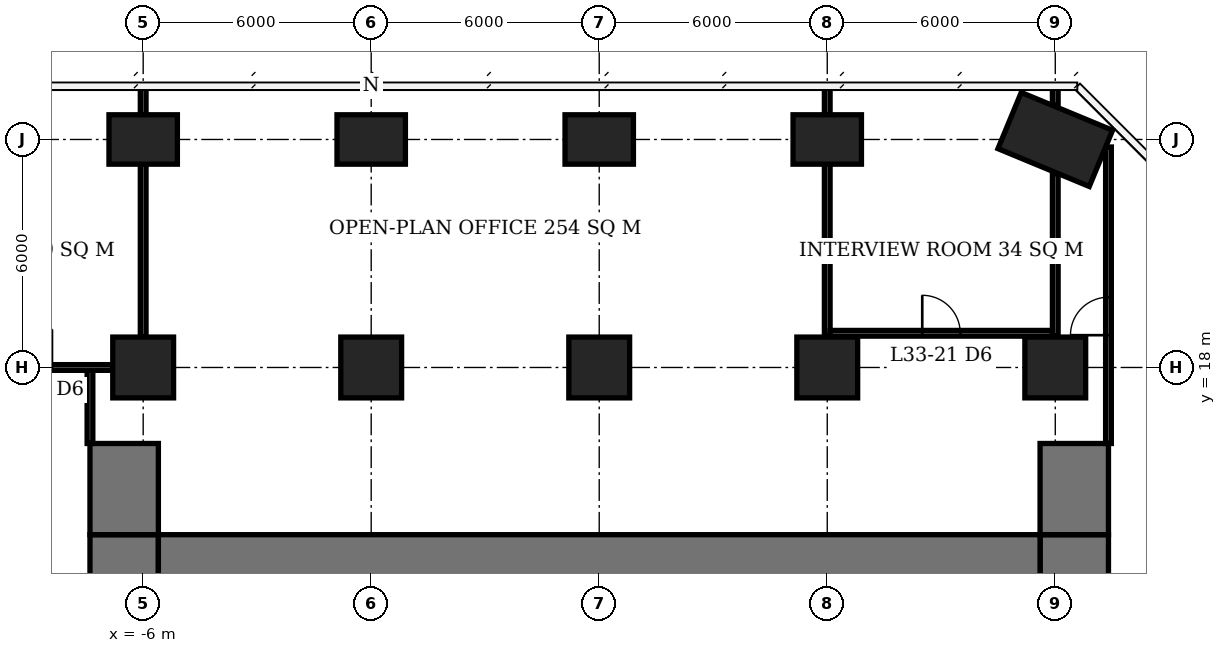
"""IFC4 building model, lengths in metres.
Left out: names, types, materials, properties, quantities, classifications, styles, units other than length and angle.
Written with IfcOpenShell. Run it as: python <this file> out.ifc"""

import sys

from ifc_helpers import new_model, si_unit, direction, frame, frame_2d, origin, origin_2d, place, context, subcontext, project, spatial, rectangle, extrude, element, fill, save


model = new_model("IFC4")
c1 = context("Model", 3, precision=1e-05, world=origin(), true_north=direction((0.0, 1.0)))
c2 = subcontext(c1, "Body", "Model", "MODEL_VIEW")
j1 = project(units=[si_unit("LENGTHUNIT", "METRE"), si_unit("PLANEANGLEUNIT", "RADIAN")], contexts=[c1])
p1 = place(None, origin())
s1 = spatial("IfcSite", under=j1, at=p1, CompositionType="ELEMENT")
p2 = place(p1, origin())
s2 = spatial("IfcBuilding", under=s1, at=p2, CompositionType="ELEMENT")
p3 = place(p2, frame((0.0, 0.0, 136.7)))
s3 = spatial("IfcBuildingStorey", under=s2, at=p3, CompositionType="ELEMENT", Elevation=136.7)
p4 = place(p3, frame((-6.0, 18.0, 0.0), z_axis=(0.0, 0.0, 1.0), x_axis=(1.0, 0.0, 0.0)))
e1 = element("IfcColumn", 1, at=p4, inside=s3, PredefinedType="COLUMN", context=c2, shape_type="SweptSolid", body=[
    extrude(rectangle(XDim=1.6, YDim=1.6, at=origin_2d()), origin(), (0.0, 0.0, 1.0), 3.9),
])
p5 = place(p3, frame((-6.0, 24.0, 0.0), z_axis=(0.0, 0.0, 1.0), x_axis=(1.0, 0.0, 0.0)))
e2 = element("IfcColumn", 2, at=p5, inside=s3, PredefinedType="COLUMN", context=c2, shape_type="SweptSolid", body=[
    extrude(rectangle(XDim=1.8, YDim=1.3, at=origin_2d()), origin(), (0.0, 0.0, 1.0), 3.9),
])
p6 = place(p3, frame((0.0, 18.0, 0.0), z_axis=(0.0, 0.0, 1.0), x_axis=(1.0, 0.0, 0.0)))
e3 = element("IfcColumn", 3, at=p6, inside=s3, PredefinedType="COLUMN", context=c2, shape_type="SweptSolid", body=[
    extrude(rectangle(XDim=1.6, YDim=1.6, at=origin_2d()), origin(), (0.0, 0.0, 1.0), 3.9),
])
p7 = place(p3, frame((0.0, 24.0, 0.0), z_axis=(0.0, 0.0, 1.0), x_axis=(1.0, 0.0, 0.0)))
e4 = element("IfcColumn", 4, at=p7, inside=s3, PredefinedType="COLUMN", context=c2, shape_type="SweptSolid", body=[
    extrude(rectangle(XDim=1.8, YDim=1.3, at=origin_2d()), origin(), (0.0, 0.0, 1.0), 3.9),
])
p8 = place(p3, frame((6.0, 18.0, 0.0), z_axis=(0.0, 0.0, 1.0), x_axis=(1.0, 0.0, 0.0)))
e5 = element("IfcColumn", 5, at=p8, inside=s3, PredefinedType="COLUMN", context=c2, shape_type="SweptSolid", body=[
    extrude(rectangle(XDim=1.6, YDim=1.6, at=origin_2d()), origin(), (0.0, 0.0, 1.0), 3.9),
])
p9 = place(p3, frame((6.0, 24.0, 0.0), z_axis=(0.0, 0.0, 1.0), x_axis=(1.0, 0.0, 0.0)))
e6 = element("IfcColumn", 6, at=p9, inside=s3, PredefinedType="COLUMN", context=c2, shape_type="SweptSolid", body=[
    extrude(rectangle(XDim=1.8, YDim=1.3, at=origin_2d()), origin(), (0.0, 0.0, 1.0), 3.9),
])
p10 = place(p3, frame((12.0, 18.0, 0.0), z_axis=(0.0, 0.0, 1.0), x_axis=(1.0, 0.0, 0.0)))
e7 = element("IfcColumn", 7, at=p10, inside=s3, PredefinedType="COLUMN", context=c2, shape_type="SweptSolid", body=[
    extrude(rectangle(XDim=1.6, YDim=1.6, at=origin_2d()), origin(), (0.0, 0.0, 1.0), 3.9),
])
p11 = place(p3, frame((12.0, 24.0, 0.0), z_axis=(0.0, 0.0, 1.0), x_axis=(1.0, 0.0, 0.0)))
e8 = element("IfcColumn", 8, at=p11, inside=s3, PredefinedType="COLUMN", context=c2, shape_type="SweptSolid", body=[
    extrude(rectangle(XDim=1.8, YDim=1.3, at=origin_2d()), origin(), (0.0, 0.0, 1.0), 3.9),
])
p12 = place(p3, frame((18.0, 18.0, 0.0), z_axis=(0.0, 0.0, 1.0), x_axis=(1.0, 0.0, 0.0)))
e9 = element("IfcColumn", 9, at=p12, inside=s3, PredefinedType="COLUMN", context=c2, shape_type="SweptSolid", body=[
    extrude(rectangle(XDim=1.6, YDim=1.6, at=origin_2d()), origin(), (0.0, 0.0, 1.0), 3.9),
])
p13 = place(p3, frame((18.0, 24.0, 0.0), z_axis=(0.0, 0.0, 1.0), x_axis=(0.923879532511, -0.382683432365, 0.0)))
e10 = element("IfcColumn", 10, at=p13, inside=s3, PredefinedType="COLUMN", context=c2, shape_type="SweptSolid", body=[
    extrude(rectangle(XDim=2.6, YDim=1.6, at=origin_2d()), origin(), (0.0, 0.0, 1.0), 3.9),
])
p14 = place(p3, frame((-5.6, 12.6, 0.0), z_axis=(0.0, 0.0, 1.0), x_axis=(1.0, 0.0, 0.0)))
e11 = element("IfcWall", 11, at=p14, inside=s3, PredefinedType="SHEAR", context=c2, shape_type="SweptSolid", body=[
    extrude(rectangle(XDim=23.2, YDim=2.0, at=frame_2d((11.6, 0.0))), origin(), (0.0, 0.0, 1.0), 3.9),
])
p15 = place(p3, frame((-6.5, -7.6, 0.0), z_axis=(0.0, 0.0, 1.0), x_axis=(0.0, 1.0, 0.0)))
e12 = element("IfcWall", 12, at=p15, inside=s3, PredefinedType="SHEAR", context=c2, shape_type="SweptSolid", body=[
    extrude(rectangle(XDim=21.2, YDim=1.8, at=frame_2d((10.6, 0.0))), origin(), (0.0, 0.0, 1.0), 3.9),
])
p16 = place(p15, frame((7.8, 0.0, 0.0)))
e13 = element("IfcOpeningElement", 13, at=p16, cuts=e12, PredefinedType="OPENING", context=c2, shape_type="SweptSolid", body=[
    extrude(rectangle(XDim=1.8, YDim=2.4, at=frame_2d((0.9, 1.2))), frame((0.0, 0.91, 0.0), z_axis=(0.0, -1.0, 0.0), x_axis=(1.0, 0.0, 0.0)), (0.0, 0.0, 1.0), 1.82),
])
p17 = place(p3, frame((18.5, -7.6, 0.0), z_axis=(0.0, 0.0, 1.0), x_axis=(0.0, 1.0, 0.0)))
e14 = element("IfcWall", 14, at=p17, inside=s3, PredefinedType="SHEAR", context=c2, shape_type="SweptSolid", body=[
    extrude(rectangle(XDim=21.2, YDim=1.8, at=frame_2d((10.6, 0.0))), origin(), (0.0, 0.0, 1.0), 3.9),
])
p18 = place(p17, frame((9.2, 0.0, 0.0)))
e15 = element("IfcOpeningElement", 15, at=p18, cuts=e14, PredefinedType="OPENING", context=c2, shape_type="SweptSolid", body=[
    extrude(rectangle(XDim=1.8, YDim=2.4, at=frame_2d((0.9, 1.2))), frame((0.0, 0.91, 0.0), z_axis=(0.0, -1.0, 0.0), x_axis=(1.0, 0.0, 0.0)), (0.0, 0.0, 1.0), 1.82),
])
for number, where, z_axis, x_axis in (
    (16, (-6.5, 13.6, 0.0), (0.0, 0.0, 1.0), (0.0, 1.0, 0.0)),
    (17, (18.5, 13.6, 0.0), (0.0, 0.0, 1.0), (0.0, 1.0, 0.0)),
):
    element("IfcWall", number, at=place(p3, frame(where, z_axis=z_axis, x_axis=x_axis)), inside=s3, PredefinedType="SHEAR", context=c2, shape_type="SweptSolid", body=[
        extrude(rectangle(XDim=2.4, YDim=1.8, at=frame_2d((1.2, 0.0))), origin(), (0.0, 0.0, 1.0), 3.9),
    ])
p19 = place(p3, frame((-11.2, 18.0, 0.0), z_axis=(0.0, 0.0, 1.0), x_axis=(1.0, 0.0, 0.0)))
e18 = element("IfcWall", 18, at=p19, inside=s3, PredefinedType="PARTITIONING", context=c2, shape_type="SweptSolid", body=[
    extrude(rectangle(XDim=4.4, YDim=0.15, at=frame_2d((2.2, 0.0))), origin(), (0.0, 0.0, 1.0), 3.65),
])
p20 = place(p19, frame((1.8, 0.0, 0.0)))
e19 = element("IfcOpeningElement", 19, at=p20, cuts=e18, PredefinedType="OPENING", context=c2, shape_type="SweptSolid", body=[
    extrude(rectangle(XDim=1.0, YDim=2.1, at=frame_2d((0.5, 1.05))), frame((0.0, 0.085, 0.0), z_axis=(0.0, -1.0, 0.0), x_axis=(1.0, 0.0, 0.0)), (0.0, 0.0, 1.0), 0.17),
])
p21 = place(p3, frame((12.075, 18.9, 0.0), z_axis=(0.0, 0.0, 1.0), x_axis=(1.0, 0.0, 0.0)))
e20 = element("IfcWall", 20, at=p21, inside=s3, PredefinedType="PARTITIONING", context=c2, shape_type="SweptSolid", body=[
    extrude(rectangle(XDim=5.85, YDim=0.15, at=frame_2d((2.925, 0.0))), origin(), (0.0, 0.0, 1.0), 3.65),
])
p22 = place(p21, frame((2.425, 0.0, 0.0)))
e21 = element("IfcOpeningElement", 21, at=p22, cuts=e20, PredefinedType="OPENING", context=c2, shape_type="SweptSolid", body=[
    extrude(rectangle(XDim=1.0, YDim=2.1, at=frame_2d((0.5, 1.05))), frame((0.0, 0.085, 0.0), z_axis=(0.0, -1.0, 0.0), x_axis=(1.0, 0.0, 0.0)), (0.0, 0.0, 1.0), 0.17),
])
p23 = place(p3, frame((-6.0, 18.8, 0.0), z_axis=(0.0, 0.0, 1.0), x_axis=(0.0, 1.0, 0.0)))
e22 = element("IfcWall", 22, at=p23, inside=s3, PredefinedType="PARTITIONING", context=c2, shape_type="SweptSolid", body=[
    extrude(rectangle(XDim=4.55, YDim=0.15, at=frame_2d((2.275, 0.0))), origin(), (0.0, 0.0, 1.0), 3.65),
])
p24 = place(p3, frame((-6.0, 24.65, 0.0), z_axis=(0.0, 0.0, 1.0), x_axis=(0.0, 1.0, 0.0)))
e23 = element("IfcWall", 23, at=p24, inside=s3, PredefinedType="PARTITIONING", context=c2, shape_type="SweptSolid", body=[
    extrude(rectangle(XDim=0.75, YDim=0.15, at=frame_2d((0.375, 0.0))), origin(), (0.0, 0.0, 1.0), 3.65),
])
p25 = place(p3, frame((12.0, 18.825, 0.0), z_axis=(0.0, 0.0, 1.0), x_axis=(0.0, 1.0, 0.0)))
e24 = element("IfcWall", 24, at=p25, inside=s3, PredefinedType="PARTITIONING", context=c2, shape_type="SweptSolid", body=[
    extrude(rectangle(XDim=4.525, YDim=0.15, at=frame_2d((2.263, 0.0))), origin(), (0.0, 0.0, 1.0), 3.65),
])
p26 = place(p3, frame((12.0, 24.65, 0.0), z_axis=(0.0, 0.0, 1.0), x_axis=(0.0, 1.0, 0.0)))
e25 = element("IfcWall", 25, at=p26, inside=s3, PredefinedType="PARTITIONING", context=c2, shape_type="SweptSolid", body=[
    extrude(rectangle(XDim=0.75, YDim=0.15, at=frame_2d((0.375, 0.0))), origin(), (0.0, 0.0, 1.0), 3.65),
])
p27 = place(p3, frame((18.0, 18.825, 0.0), z_axis=(0.0, 0.0, 1.0), x_axis=(0.0, 1.0, 0.0)))
e26 = element("IfcWall", 26, at=p27, inside=s3, PredefinedType="PARTITIONING", context=c2, shape_type="SweptSolid", body=[
    extrude(rectangle(XDim=4.278, YDim=0.15, at=frame_2d((2.139, 0.0))), origin(), (0.0, 0.0, 1.0), 3.65),
])
p28 = place(p3, frame((18.0, 24.897, 0.0), z_axis=(0.0, 0.0, 1.0), x_axis=(0.0, 1.0, 0.0)))
e27 = element("IfcWall", 27, at=p28, inside=s3, PredefinedType="PARTITIONING", context=c2, shape_type="SweptSolid", body=[
    extrude(rectangle(XDim=0.503, YDim=0.15, at=frame_2d((0.251, 0.0))), origin(), (0.0, 0.0, 1.0), 3.65),
])
p29 = place(p3, frame((-7.4, 16.0, 0.0), z_axis=(0.0, 0.0, 1.0), x_axis=(0.0, 1.0, 0.0)))
e28 = element("IfcWall", 28, at=p29, inside=s3, PredefinedType="PARTITIONING", context=c2, shape_type="SweptSolid", body=[
    extrude(rectangle(XDim=1.925, YDim=0.15, at=frame_2d((0.962, 0.0))), origin(), (0.0, 0.0, 1.0), 3.65),
])
p30 = place(p3, frame((19.4, 16.0, 0.0), z_axis=(0.0, 0.0, 1.0), x_axis=(0.0, 1.0, 0.0)))
e29 = element("IfcWall", 29, at=p30, inside=s3, PredefinedType="PARTITIONING", context=c2, shape_type="SweptSolid", body=[
    extrude(rectangle(XDim=7.802, YDim=0.15, at=frame_2d((3.901, 0.0))), origin(), (0.0, 0.0, 1.0), 3.65),
])
p31 = place(p30, frame((2.85, 0.0, 0.0)))
e30 = element("IfcOpeningElement", 30, at=p31, cuts=e29, PredefinedType="OPENING", context=c2, shape_type="SweptSolid", body=[
    extrude(rectangle(XDim=1.0, YDim=2.1, at=frame_2d((0.5, 1.05))), frame((0.0, 0.085, 0.0), z_axis=(0.0, -1.0, 0.0), x_axis=(1.0, 0.0, 0.0)), (0.0, 0.0, 1.0), 0.17),
])
p32 = place(p22, origin())
e31 = element("IfcDoor", 31, at=p32, inside=s3, OperationType="SINGLE_SWING_LEFT", PredefinedType="DOOR", context=c2, shape_type="SweptSolid", body=[
    extrude(rectangle(XDim=1.0, YDim=2.1, at=frame_2d((0.5, 1.05))), frame((0.0, 0.025, 0.0), z_axis=(0.0, -1.0, 0.0), x_axis=(1.0, 0.0, 0.0)), (0.0, 0.0, 1.0), 0.05),
])
fill(e21, e31)
p33 = place(p31, origin())
e32 = element("IfcDoor", 32, at=p33, inside=s3, OperationType="SINGLE_SWING_LEFT", PredefinedType="DOOR", context=c2, shape_type="SweptSolid", body=[
    extrude(rectangle(XDim=1.0, YDim=2.1, at=frame_2d((0.5, 1.05))), frame((0.0, 0.025, 0.0), z_axis=(0.0, -1.0, 0.0), x_axis=(1.0, 0.0, 0.0)), (0.0, 0.0, 1.0), 0.05),
])
fill(e30, e32)
save(model, sys.argv[1])
